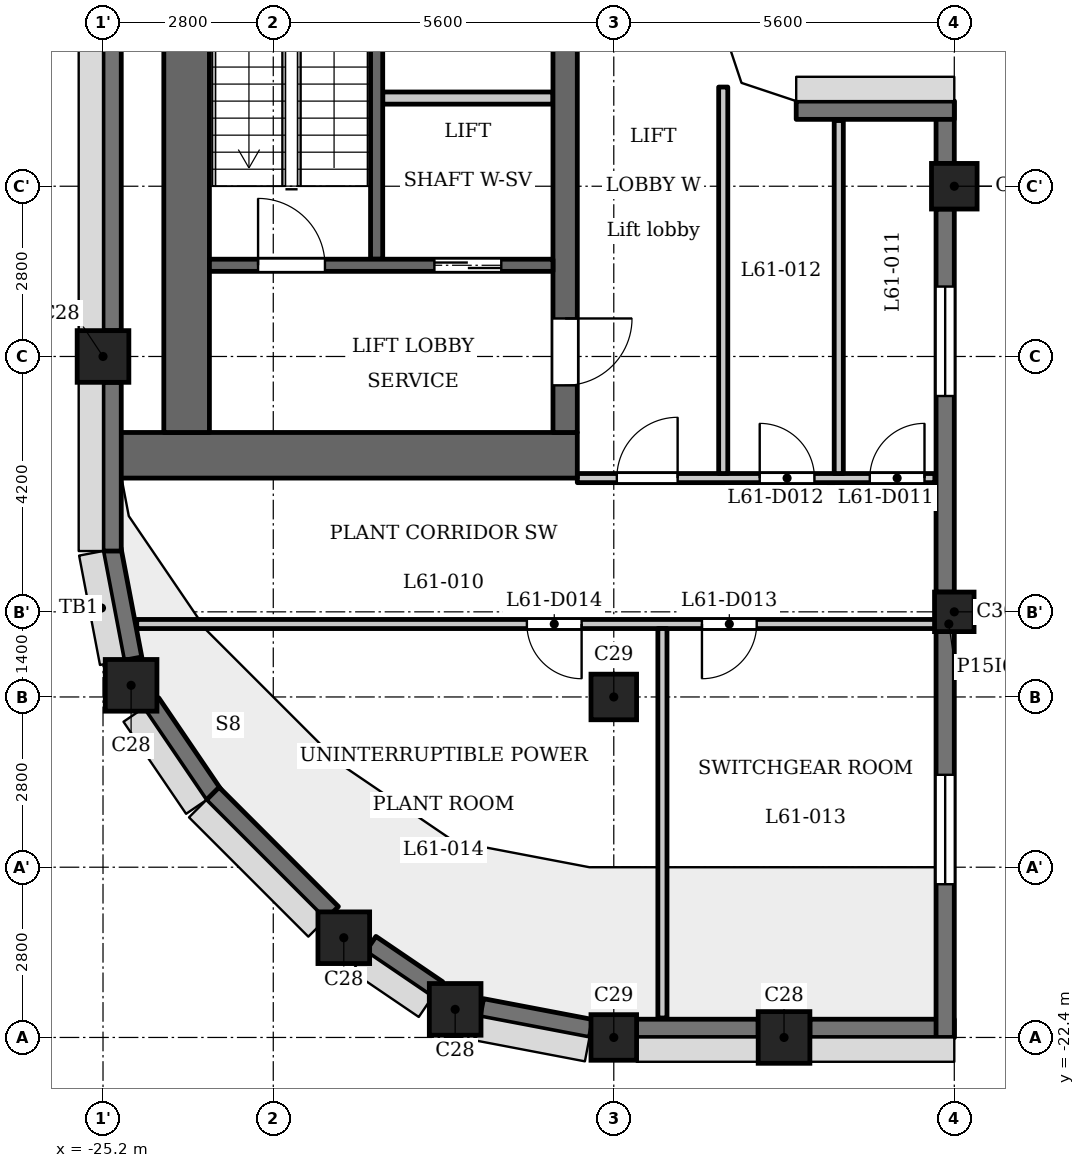
"""IFC4 building model, lengths in metres.
Left out: names, types, materials, properties, quantities, classifications, styles, units other than length and angle.
Written with IfcOpenShell. Run it as: python <this file> out.ifc"""

import sys

from ifc_helpers import new_model, si_unit, direction, frame, frame_2d, origin, origin_2d, place, context, subcontext, project, spatial, polyline, rectangle, outline, extrude, element, fill, save


model = new_model("IFC4")
c1 = context("Model", 3, precision=1e-05, world=origin(), true_north=direction((0.0, 1.0)))
c2 = subcontext(c1, "Body", "Model", "MODEL_VIEW")
j1 = project(units=[si_unit("LENGTHUNIT", "METRE"), si_unit("PLANEANGLEUNIT", "RADIAN")], contexts=[c1])
p1 = place(None, origin())
s1 = spatial("IfcSite", under=j1, at=p1, CompositionType="ELEMENT")
p2 = place(p1, origin())
s2 = spatial("IfcBuilding", under=s1, at=p2, CompositionType="ELEMENT")
p3 = place(p2, frame((0.0, 0.0, 236.3)))
s3 = spatial("IfcBuildingStorey", under=s2, at=p3, CompositionType="ELEMENT", Elevation=236.3)
for number, where, z_axis, x_axis in (
    (1, (-19.409, -21.938, 0.0), (0.0, 0.0, 1.0), (1.0, 0.0, 0.0)),
    (2, (-14.0, -22.4, 0.0), (0.0, 0.0, 1.0), (1.0, 0.0, 0.0)),
    (3, (-25.2, -11.2, 0.0), (0.0, 0.0, 1.0), (1.0, 0.0, 0.0)),
    (4, (-24.738, -16.609, 0.0), (0.0, 0.0, 1.0), (1.0, 0.0, 0.0)),
    (5, (-21.24, -20.76, 0.0), (0.0, 0.0, 1.0), (1.0, 0.0, 0.0)),
):
    element("IfcColumn", number, at=place(p3, frame(where, z_axis=z_axis, x_axis=x_axis)), inside=s3, PredefinedType="COLUMN", context=c2, shape_type="SweptSolid", body=[
        extrude(rectangle(XDim=0.85, YDim=0.85, at=origin_2d()), origin(), (0.0, 0.0, 1.0), 5.4),
    ])
for number, where, z_axis, x_axis in (
    (6, (-16.8, -22.4, 0.0), (0.0, 0.0, 1.0), (1.0, 0.0, 0.0)),
    (7, (-16.8, -16.8, 0.0), (0.0, 0.0, 1.0), (1.0, 0.0, 0.0)),
    (8, (-11.2, -8.4, 0.0), (0.0, 0.0, 1.0), (1.0, 0.0, 0.0)),
):
    element("IfcColumn", number, at=place(p3, frame(where, z_axis=z_axis, x_axis=x_axis)), inside=s3, PredefinedType="COLUMN", context=c2, shape_type="SweptSolid", body=[
        extrude(rectangle(XDim=0.75, YDim=0.75, at=origin_2d()), origin(), (0.0, 0.0, 1.0), 5.4),
    ])
p4 = place(p3, frame((-11.2, -15.4, 0.0), z_axis=(0.0, 0.0, 1.0), x_axis=(1.0, 0.0, 0.0)))
e9 = element("IfcColumn", 9, at=p4, inside=s3, PredefinedType="COLUMN", context=c2, shape_type="SweptSolid", body=[
    extrude(rectangle(XDim=0.65, YDim=0.65, at=origin_2d()), origin(), (0.0, 0.0, 1.0), 5.4),
])
for number, where, z_axis, x_axis in (
    (10, (-25.053, -14.372, 0.0), (0.0, 0.0, 1.0), (0.187, -0.982, 0.0)),
    (11, (-24.408, -16.898, 0.0), (0.0, 0.0, 1.0), (0.562, -0.827, 0.0)),
):
    element("IfcWall", number, at=place(p3, frame(where, z_axis=z_axis, x_axis=x_axis)), inside=s3, PredefinedType="SOLIDWALL", context=c2, shape_type="SweptSolid", body=[
        extrude(rectangle(XDim=1.831, YDim=0.3, at=frame_2d((0.916, 0.0))), origin(), (0.0, 0.0, 1.0), 2.6),
    ])
p5 = place(p3, frame((-23.397, -18.391, 0.0), z_axis=(0.0, 0.0, 1.0), x_axis=(0.707106781187, -0.707106781187, 0.0)))
e12 = element("IfcWall", 12, at=p5, inside=s3, PredefinedType="SOLIDWALL", context=c2, shape_type="SweptSolid", body=[
    extrude(rectangle(XDim=2.775, YDim=0.3, at=frame_2d((1.388, 0.0))), origin(), (0.0, 0.0, 1.0), 2.6),
])
p6 = place(p3, frame((-20.796, -20.862, 0.0), z_axis=(0.0, 0.0, 1.0), x_axis=(0.827035970432, -0.562149004813, 0.0)))
e13 = element("IfcWall", 13, at=p6, inside=s3, PredefinedType="SOLIDWALL", context=c2, shape_type="SweptSolid", body=[
    extrude(rectangle(XDim=1.327, YDim=0.3, at=frame_2d((0.664, 0.0))), origin(), (0.0, 0.0, 1.0), 2.6),
])
p7 = place(p3, frame((-18.971, -21.91, 0.0), z_axis=(0.0, 0.0, 1.0), x_axis=(0.982300037503, -0.187314271538, 0.0)))
e14 = element("IfcWall", 14, at=p7, inside=s3, PredefinedType="SOLIDWALL", context=c2, shape_type="SweptSolid", body=[
    extrude(rectangle(XDim=1.831, YDim=0.3, at=frame_2d((0.916, 0.0))), origin(), (0.0, 0.0, 1.0), 2.6),
])
p8 = place(p3, frame((-16.425, -22.25, 0.0), z_axis=(0.0, 0.0, 1.0), x_axis=(1.0, 0.0, 0.0)))
e15 = element("IfcWall", 15, at=p8, inside=s3, PredefinedType="SOLIDWALL", context=c2, shape_type="SweptSolid", body=[
    extrude(rectangle(XDim=2.0, YDim=0.3, at=frame_2d((1.0, 0.0))), origin(), (0.0, 0.0, 1.0), 2.6),
])
p9 = place(p3, frame((-13.575, -22.25, 0.0), z_axis=(0.0, 0.0, 1.0), x_axis=(1.0, 0.0, 0.0)))
e16 = element("IfcWall", 16, at=p9, inside=s3, PredefinedType="SOLIDWALL", context=c2, shape_type="SweptSolid", body=[
    extrude(rectangle(XDim=2.375, YDim=0.3, at=frame_2d((1.188, 0.0))), origin(), (0.0, 0.0, 1.0), 4.6),
])
p10 = place(p3, frame((-11.35, -22.4, 0.0), z_axis=(0.0, 0.0, 1.0), x_axis=(0.0, 1.0, 0.0)))
e17 = element("IfcWall", 17, at=p10, inside=s3, PredefinedType="SOLIDWALL", context=c2, shape_type="SweptSolid", body=[
    extrude(rectangle(XDim=6.675, YDim=0.3, at=frame_2d((3.337, 0.0))), origin(), (0.0, 0.0, 1.0), 4.6),
])
p11 = place(p10, frame((2.52, 0.0, 0.9)))
e18 = element("IfcOpeningElement", 18, at=p11, cuts=e17, PredefinedType="OPENING", context=c2, shape_type="SweptSolid", body=[
    extrude(rectangle(XDim=1.8, YDim=1.5, at=frame_2d((0.9, 0.75))), frame((0.0, 0.16, 0.0), z_axis=(0.0, -1.0, 0.0), x_axis=(1.0, 0.0, 0.0)), (0.0, 0.0, 1.0), 0.32),
])
p12 = place(p3, frame((-11.35, -15.075, 0.0), z_axis=(0.0, 0.0, 1.0), x_axis=(0.0, 1.0, 0.0)))
e19 = element("IfcWall", 19, at=p12, inside=s3, PredefinedType="SOLIDWALL", context=c2, shape_type="SweptSolid", body=[
    extrude(rectangle(XDim=6.3, YDim=0.3, at=frame_2d((3.15, 0.0))), origin(), (0.0, 0.0, 1.0), 4.6),
])
p13 = place(p12, frame((3.225, 0.0, 0.9)))
e20 = element("IfcOpeningElement", 20, at=p13, cuts=e19, PredefinedType="OPENING", context=c2, shape_type="SweptSolid", body=[
    extrude(rectangle(XDim=1.8, YDim=1.5, at=frame_2d((0.9, 0.75))), frame((0.0, 0.16, 0.0), z_axis=(0.0, -1.0, 0.0), x_axis=(1.0, 0.0, 0.0)), (0.0, 0.0, 1.0), 0.32),
])
p14 = place(p3, frame((-11.35, -8.025, 0.0), z_axis=(0.0, 0.0, 1.0), x_axis=(0.0, 1.0, 0.0)))
e21 = element("IfcWall", 21, at=p14, inside=s3, PredefinedType="SOLIDWALL", context=c2, shape_type="SweptSolid", body=[
    extrude(rectangle(XDim=1.025, YDim=0.3, at=frame_2d((0.512, 0.0))), origin(), (0.0, 0.0, 1.0), 4.6),
])
p15 = place(p3, frame((-11.2, -7.15, 0.0), z_axis=(0.0, 0.0, 1.0), x_axis=(-1.0, 0.0, 0.0)))
e22 = element("IfcWall", 22, at=p15, inside=s3, PredefinedType="SOLIDWALL", context=c2, shape_type="SweptSolid", body=[
    extrude(rectangle(XDim=2.6, YDim=0.3, at=frame_2d((1.3, 0.0))), origin(), (0.0, 0.0, 1.0), 4.6),
])
p16 = place(p3, frame((-25.05, -6.025, 0.0), z_axis=(0.0, 0.0, 1.0), x_axis=(0.0, -1.0, 0.0)))
e23 = element("IfcWall", 23, at=p16, inside=s3, PredefinedType="SOLIDWALL", context=c2, shape_type="SweptSolid", body=[
    extrude(rectangle(XDim=4.75, YDim=0.3, at=frame_2d((2.375, 0.0))), origin(), (0.0, 0.0, 1.0), 2.6),
])
p17 = place(p3, frame((-25.05, -11.625, 0.0), z_axis=(0.0, 0.0, 1.0), x_axis=(0.0, -1.0, 0.0)))
e24 = element("IfcWall", 24, at=p17, inside=s3, PredefinedType="SOLIDWALL", context=c2, shape_type="SweptSolid", body=[
    extrude(rectangle(XDim=2.775, YDim=0.3, at=frame_2d((1.387, 0.0))), origin(), (0.0, 0.0, 1.0), 2.6),
])
p18 = place(p3, frame((-20.7, -9.6, 0.0), z_axis=(0.0, 0.0, 1.0), x_axis=(0.0, 1.0, 0.0)))
e25 = element("IfcWall", 25, at=p18, inside=s3, PredefinedType="SHEAR", context=c2, shape_type="SweptSolid", body=[
    extrude(rectangle(XDim=7.35, YDim=0.2, at=frame_2d((3.675, 0.0))), origin(), (0.0, 0.0, 1.0), 4.6),
])
p19 = place(p3, frame((-17.4, -12.825, 0.0), z_axis=(0.0, 0.0, 1.0), x_axis=(-1.0, 0.0, 0.0)))
e26 = element("IfcWall", 26, at=p19, inside=s3, PredefinedType="SHEAR", context=c2, shape_type="SweptSolid", body=[
    extrude(rectangle(XDim=7.6, YDim=0.75, at=frame_2d((3.8, 0.0))), origin(), (0.0, 0.0, 1.0), 4.6),
])
p20 = place(p3, frame((-17.6, -12.45, 0.0), z_axis=(0.0, 0.0, 1.0), x_axis=(0.0, 1.0, 0.0)))
e27 = element("IfcWall", 27, at=p20, inside=s3, PredefinedType="SHEAR", context=c2, shape_type="SweptSolid", body=[
    extrude(rectangle(XDim=24.9, YDim=0.4, at=frame_2d((12.45, 0.0))), origin(), (0.0, 0.0, 1.0), 4.6),
])
p21 = place(p20, frame((11.05, 0.0, 0.0)))
e28 = element("IfcOpeningElement", 28, at=p21, cuts=e27, PredefinedType="OPENING", context=c2, shape_type="SweptSolid", body=[
    extrude(rectangle(XDim=0.9, YDim=2.1, at=frame_2d((0.45, 1.05))), frame((0.0, 0.21, 0.0), z_axis=(0.0, -1.0, 0.0), x_axis=(1.0, 0.0, 0.0)), (0.0, 0.0, 1.0), 0.42),
])
p22 = place(p20, frame((15.6, 0.0, 0.0)))
e29 = element("IfcOpeningElement", 29, at=p22, cuts=e27, PredefinedType="OPENING", context=c2, shape_type="SweptSolid", body=[
    extrude(rectangle(XDim=1.1, YDim=2.1, at=frame_2d((0.55, 1.05))), frame((0.0, 0.21, 0.0), z_axis=(0.0, -1.0, 0.0), x_axis=(1.0, 0.0, 0.0)), (0.0, 0.0, 1.0), 0.42),
])
p23 = place(p20, frame((18.0, 0.0, 0.0)))
e30 = element("IfcOpeningElement", 30, at=p23, cuts=e27, PredefinedType="OPENING", context=c2, shape_type="SweptSolid", body=[
    extrude(rectangle(XDim=1.1, YDim=2.1, at=frame_2d((0.55, 1.05))), frame((0.0, 0.21, 0.0), z_axis=(0.0, -1.0, 0.0), x_axis=(1.0, 0.0, 0.0)), (0.0, 0.0, 1.0), 0.42),
])
p24 = place(p20, frame((23.025, 0.0, 0.0)))
e31 = element("IfcOpeningElement", 31, at=p24, cuts=e27, PredefinedType="OPENING", context=c2, shape_type="SweptSolid", body=[
    extrude(rectangle(XDim=1.1, YDim=2.1, at=frame_2d((0.55, 1.05))), frame((0.0, 0.21, 0.0), z_axis=(0.0, -1.0, 0.0), x_axis=(1.0, 0.0, 0.0)), (0.0, 0.0, 1.0), 0.42),
])
p25 = place(p20, frame((0.775, 0.0, 0.0)))
e32 = element("IfcOpeningElement", 32, at=p25, cuts=e27, PredefinedType="OPENING", context=c2, shape_type="SweptSolid", body=[
    extrude(rectangle(XDim=1.1, YDim=2.1, at=frame_2d((0.55, 1.05))), frame((0.0, 0.21, 0.0), z_axis=(0.0, -1.0, 0.0), x_axis=(1.0, 0.0, 0.0)), (0.0, 0.0, 1.0), 0.42),
])
p26 = place(p20, frame((12.925, 0.0, 0.0)))
e33 = element("IfcOpeningElement", 33, at=p26, cuts=e27, PredefinedType="OPENING", context=c2, shape_type="SweptSolid", body=[
    extrude(rectangle(XDim=1.8, YDim=2.1, at=frame_2d((0.9, 1.05))), frame((0.0, 0.21, 0.0), z_axis=(0.0, -1.0, 0.0), x_axis=(1.0, 0.0, 0.0)), (0.0, 0.0, 1.0), 0.42),
])
p27 = place(p3, frame((-23.825, -12.45, 0.0), z_axis=(0.0, 0.0, 1.0), x_axis=(0.0, 1.0, 0.0)))
e34 = element("IfcWall", 34, at=p27, inside=s3, PredefinedType="SHEAR", context=c2, shape_type="SweptSolid", body=[
    extrude(rectangle(XDim=24.9, YDim=0.75, at=frame_2d((12.45, 0.0))), origin(), (0.0, 0.0, 1.0), 4.6),
])
p28 = place(p3, frame((-17.8, -9.7, 0.0), z_axis=(0.0, 0.0, 1.0), x_axis=(-1.0, 0.0, 0.0)))
e35 = element("IfcWall", 35, at=p28, inside=s3, PredefinedType="SHEAR", context=c2, shape_type="SweptSolid", body=[
    extrude(rectangle(XDim=5.65, YDim=0.2, at=frame_2d((2.825, 0.0))), origin(), (0.0, 0.0, 1.0), 4.6),
])
p29 = place(p28, frame((0.85, 0.0, 0.0)))
e36 = element("IfcOpeningElement", 36, at=p29, cuts=e35, PredefinedType="OPENING", context=c2, shape_type="SweptSolid", body=[
    extrude(rectangle(XDim=1.1, YDim=2.1, at=frame_2d((0.55, 1.05))), frame((0.0, 0.11, 0.0), z_axis=(0.0, -1.0, 0.0), x_axis=(1.0, 0.0, 0.0)), (0.0, 0.0, 1.0), 0.22),
])
p30 = place(p28, frame((3.75, 0.0, 0.0)))
e37 = element("IfcOpeningElement", 37, at=p30, cuts=e35, PredefinedType="OPENING", context=c2, shape_type="SweptSolid", body=[
    extrude(rectangle(XDim=1.1, YDim=2.1, at=frame_2d((0.55, 1.05))), frame((0.0, 0.11, 0.0), z_axis=(0.0, -1.0, 0.0), x_axis=(1.0, 0.0, 0.0)), (0.0, 0.0, 1.0), 0.22),
])
p31 = place(p3, frame((-17.8, -6.95, 0.0), z_axis=(0.0, 0.0, 1.0), x_axis=(-1.0, 0.0, 0.0)))
e38 = element("IfcWall", 38, at=p31, inside=s3, PredefinedType="PARTITIONING", context=c2, shape_type="SweptSolid", body=[
    extrude(rectangle(XDim=2.8, YDim=0.2, at=frame_2d((1.4, 0.0))), origin(), (0.0, 0.0, 1.0), 4.6),
])
p32 = place(p3, frame((-24.646, -15.6, 0.0), z_axis=(0.0, 0.0, 1.0), x_axis=(1.0, 0.0, 0.0)))
e39 = element("IfcWall", 39, at=p32, inside=s3, PredefinedType="PARTITIONING", context=c2, shape_type="SweptSolid", body=[
    extrude(rectangle(XDim=13.356, YDim=0.15, at=frame_2d((6.678, 0.0))), origin(), (0.0, 0.0, 1.0), 4.6),
])
p33 = place(p32, frame((9.296, 0.0, 0.0)))
e40 = element("IfcOpeningElement", 40, at=p33, cuts=e39, PredefinedType="OPENING", context=c2, shape_type="SweptSolid", body=[
    extrude(rectangle(XDim=0.9, YDim=2.1, at=frame_2d((0.45, 1.05))), frame((0.0, 0.085, 0.0), z_axis=(0.0, -1.0, 0.0), x_axis=(1.0, 0.0, 0.0)), (0.0, 0.0, 1.0), 0.17),
])
p34 = place(p32, frame((6.417, 0.0, 0.0)))
e41 = element("IfcOpeningElement", 41, at=p34, cuts=e39, PredefinedType="OPENING", context=c2, shape_type="SweptSolid", body=[
    extrude(rectangle(XDim=0.9, YDim=2.1, at=frame_2d((0.45, 1.05))), frame((0.0, 0.085, 0.0), z_axis=(0.0, -1.0, 0.0), x_axis=(1.0, 0.0, 0.0)), (0.0, 0.0, 1.0), 0.17),
])
p35 = place(p3, frame((-17.4, -13.2, 0.0), z_axis=(0.0, 0.0, 1.0), x_axis=(1.0, 0.0, 0.0)))
e42 = element("IfcWall", 42, at=p35, inside=s3, PredefinedType="PARTITIONING", context=c2, shape_type="SweptSolid", body=[
    extrude(rectangle(XDim=5.88, YDim=0.15, at=frame_2d((2.94, 0.0))), origin(), (0.0, 0.0, 1.0), 4.6),
])
p36 = place(p35, frame((0.65, 0.0, 0.0)))
e43 = element("IfcOpeningElement", 43, at=p36, cuts=e42, PredefinedType="OPENING", context=c2, shape_type="SweptSolid", body=[
    extrude(rectangle(XDim=1.0, YDim=2.1, at=frame_2d((0.5, 1.05))), frame((0.0, 0.085, 0.0), z_axis=(0.0, -1.0, 0.0), x_axis=(1.0, 0.0, 0.0)), (0.0, 0.0, 1.0), 0.17),
])
p37 = place(p35, frame((4.81, 0.0, 0.0)))
e44 = element("IfcOpeningElement", 44, at=p37, cuts=e42, PredefinedType="OPENING", context=c2, shape_type="SweptSolid", body=[
    extrude(rectangle(XDim=0.9, YDim=2.1, at=frame_2d((0.45, 1.05))), frame((0.0, 0.085, 0.0), z_axis=(0.0, -1.0, 0.0), x_axis=(1.0, 0.0, 0.0)), (0.0, 0.0, 1.0), 0.17),
])
p38 = place(p35, frame((3.0, 0.0, 0.0)))
e45 = element("IfcOpeningElement", 45, at=p38, cuts=e42, PredefinedType="OPENING", context=c2, shape_type="SweptSolid", body=[
    extrude(rectangle(XDim=0.9, YDim=2.1, at=frame_2d((0.45, 1.05))), frame((0.0, 0.085, 0.0), z_axis=(0.0, -1.0, 0.0), x_axis=(1.0, 0.0, 0.0)), (0.0, 0.0, 1.0), 0.17),
])
p39 = place(p3, frame((-16.0, -22.08, 0.0), z_axis=(0.0, 0.0, 1.0), x_axis=(0.0, 1.0, 0.0)))
e46 = element("IfcWall", 46, at=p39, inside=s3, PredefinedType="PARTITIONING", context=c2, shape_type="SweptSolid", body=[
    extrude(rectangle(XDim=6.405, YDim=0.15, at=frame_2d((3.203, 0.0))), origin(), (0.0, 0.0, 1.0), 4.6),
])
p40 = place(p3, frame((-15.0, -13.125, 0.0), z_axis=(0.0, 0.0, 1.0), x_axis=(0.0, 1.0, 0.0)))
e47 = element("IfcWall", 47, at=p40, inside=s3, PredefinedType="PARTITIONING", context=c2, shape_type="SweptSolid", body=[
    extrude(rectangle(XDim=6.356, YDim=0.15, at=frame_2d((3.178, 0.0))), origin(), (0.0, 0.0, 1.0), 4.6),
])
p41 = place(p3, frame((-13.1, -13.125, 0.0), z_axis=(0.0, 0.0, 1.0), x_axis=(0.0, 1.0, 0.0)))
e48 = element("IfcWall", 48, at=p41, inside=s3, PredefinedType="PARTITIONING", context=c2, shape_type="SweptSolid", body=[
    extrude(rectangle(XDim=5.805, YDim=0.15, at=frame_2d((2.902, 0.0))), origin(), (0.0, 0.0, 1.0), 4.6),
])
p42 = place(p3, origin())
e49 = element("IfcWall", 49, at=p42, inside=s3, PredefinedType="SOLIDWALL", context=c2, shape_type="SweptSolid", body=[
    extrude(outline(polyline([(-13.8, -7.0), (-14.7, -6.7), (-15.0, -5.8), (-15.3, -5.8), (-15.3, -5.849), (-14.937, -6.937), (-13.849, -7.3), (-13.8, -7.3), (-13.8, -7.0)])), origin(), (0.0, 0.0, 1.0), 4.6),
])
p43 = place(p29, origin())
e50 = element("IfcDoor", 50, at=p43, inside=s3, OperationType="DOUBLE_DOOR_SLIDING", PredefinedType="DOOR", context=c2, shape_type="SweptSolid", body=[
    extrude(rectangle(XDim=1.1, YDim=2.1, at=frame_2d((0.55, 1.05))), frame((0.0, 0.025, 0.0), z_axis=(0.0, -1.0, 0.0), x_axis=(1.0, 0.0, 0.0)), (0.0, 0.0, 1.0), 0.05),
])
fill(e36, e50)
p44 = place(p25, origin())
e51 = element("IfcDoor", 51, at=p44, inside=s3, OperationType="SINGLE_SWING_RIGHT", PredefinedType="DOOR", context=c2, shape_type="SweptSolid", body=[
    extrude(rectangle(XDim=1.1, YDim=2.1, at=frame_2d((0.55, 1.05))), frame((0.0, 0.025, 0.0), z_axis=(0.0, -1.0, 0.0), x_axis=(1.0, 0.0, 0.0)), (0.0, 0.0, 1.0), 0.05),
])
fill(e32, e51)
p45 = place(p30, origin())
e52 = element("IfcDoor", 52, at=p45, inside=s3, OperationType="SINGLE_SWING_RIGHT", PredefinedType="DOOR", context=c2, shape_type="SweptSolid", body=[
    extrude(rectangle(XDim=1.1, YDim=2.1, at=frame_2d((0.55, 1.05))), frame((0.0, 0.025, 0.0), z_axis=(0.0, -1.0, 0.0), x_axis=(1.0, 0.0, 0.0)), (0.0, 0.0, 1.0), 0.05),
])
fill(e37, e52)
p46 = place(p36, origin())
e53 = element("IfcDoor", 53, at=p46, inside=s3, OperationType="SINGLE_SWING_LEFT", PredefinedType="DOOR", context=c2, shape_type="SweptSolid", body=[
    extrude(rectangle(XDim=1.0, YDim=2.1, at=frame_2d((0.5, 1.05))), frame((0.0, 0.025, 0.0), z_axis=(0.0, -1.0, 0.0), x_axis=(1.0, 0.0, 0.0)), (0.0, 0.0, 1.0), 0.05),
])
fill(e43, e53)
p47 = place(p37, origin())
e54 = element("IfcDoor", 54, at=p47, inside=s3, OperationType="SINGLE_SWING_LEFT", PredefinedType="DOOR", context=c2, shape_type="SweptSolid", body=[
    extrude(rectangle(XDim=0.9, YDim=2.1, at=frame_2d((0.45, 1.05))), frame((0.0, 0.025, 0.0), z_axis=(0.0, -1.0, 0.0), x_axis=(1.0, 0.0, 0.0)), (0.0, 0.0, 1.0), 0.05),
])
fill(e44, e54)
p48 = place(p38, origin())
e55 = element("IfcDoor", 55, at=p48, inside=s3, OperationType="SINGLE_SWING_RIGHT", PredefinedType="DOOR", context=c2, shape_type="SweptSolid", body=[
    extrude(rectangle(XDim=0.9, YDim=2.1, at=frame_2d((0.45, 1.05))), frame((0.0, 0.025, 0.0), z_axis=(0.0, -1.0, 0.0), x_axis=(1.0, 0.0, 0.0)), (0.0, 0.0, 1.0), 0.05),
])
fill(e45, e55)
p49 = place(p33, origin())
e56 = element("IfcDoor", 56, at=p49, inside=s3, OperationType="SINGLE_SWING_LEFT", PredefinedType="DOOR", context=c2, shape_type="SweptSolid", body=[
    extrude(rectangle(XDim=0.9, YDim=2.1, at=frame_2d((0.45, 1.05))), frame((0.0, 0.025, 0.0), z_axis=(0.0, -1.0, 0.0), x_axis=(1.0, 0.0, 0.0)), (0.0, 0.0, 1.0), 0.05),
])
fill(e40, e56)
p50 = place(p34, origin())
e57 = element("IfcDoor", 57, at=p50, inside=s3, OperationType="SINGLE_SWING_RIGHT", PredefinedType="DOOR", context=c2, shape_type="SweptSolid", body=[
    extrude(rectangle(XDim=0.9, YDim=2.1, at=frame_2d((0.45, 1.05))), frame((0.0, 0.025, 0.0), z_axis=(0.0, -1.0, 0.0), x_axis=(1.0, 0.0, 0.0)), (0.0, 0.0, 1.0), 0.05),
])
fill(e41, e57)
p51 = place(p11, origin())
e58 = element("IfcWindow", 58, at=p51, inside=s3, PartitioningType="SINGLE_PANEL", PredefinedType="WINDOW", context=c2, shape_type="SweptSolid", body=[
    extrude(rectangle(XDim=1.8, YDim=1.5, at=frame_2d((0.9, 0.75))), frame((0.0, 0.03, 0.0), z_axis=(0.0, -1.0, 0.0), x_axis=(1.0, 0.0, 0.0)), (0.0, 0.0, 1.0), 0.06),
])
fill(e18, e58)
p52 = place(p13, origin())
e59 = element("IfcWindow", 59, at=p52, inside=s3, PartitioningType="SINGLE_PANEL", PredefinedType="WINDOW", context=c2, shape_type="SweptSolid", body=[
    extrude(rectangle(XDim=1.8, YDim=1.5, at=frame_2d((0.9, 0.75))), frame((0.0, 0.03, 0.0), z_axis=(0.0, -1.0, 0.0), x_axis=(1.0, 0.0, 0.0)), (0.0, 0.0, 1.0), 0.06),
])
fill(e20, e59)
save(model, sys.argv[1])
